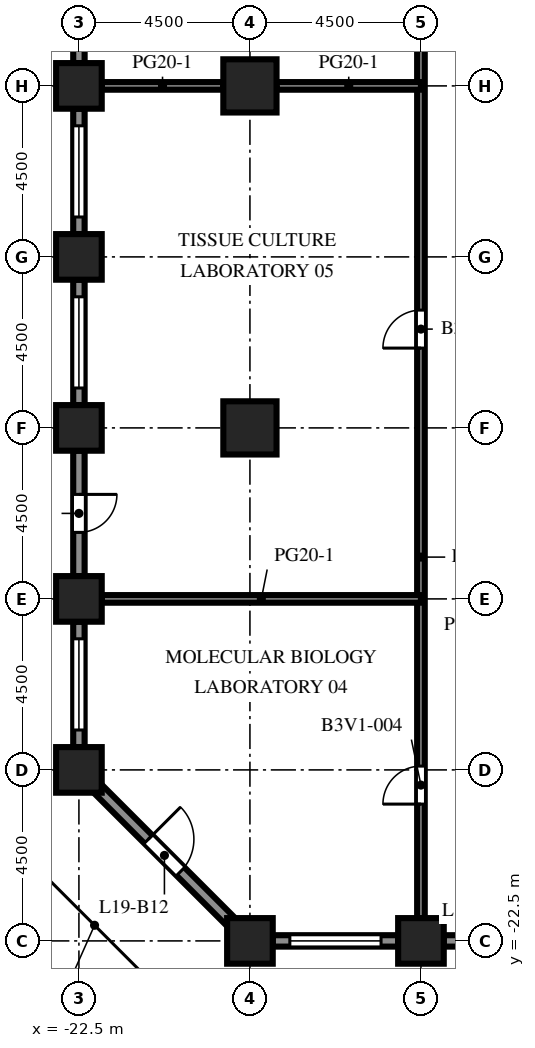
"""IFC4 building model, lengths in metres.
Left out: names, types, materials, properties, quantities, classifications, styles, units other than length and angle.
Written with IfcOpenShell. Run it as: python <this file> out.ifc"""

import sys

from ifc_helpers import new_model, si_unit, direction, frame, frame_2d, origin, origin_2d, place, context, subcontext, project, spatial, rectangle, extrude, element, fill, save


model = new_model("IFC4")
c1 = context("Model", 3, precision=1e-05, world=origin(), true_north=direction((0.0, 1.0)))
c2 = subcontext(c1, "Body", "Model", "MODEL_VIEW")
j1 = project(units=[si_unit("LENGTHUNIT", "METRE"), si_unit("PLANEANGLEUNIT", "RADIAN")], contexts=[c1])
p1 = place(None, origin())
s1 = spatial("IfcSite", under=j1, at=p1, CompositionType="ELEMENT")
p2 = place(p1, origin())
s2 = spatial("IfcBuilding", under=s1, at=p2, CompositionType="ELEMENT")
p3 = place(p2, frame((0.0, 0.0, 86.1)))
s3 = spatial("IfcBuildingStorey", under=s2, at=p3, CompositionType="ELEMENT", Elevation=86.1)
for number, where, z_axis, x_axis in (
    (1, (-22.5, -18.0, 0.0), (0.0, 0.0, 1.0), (1.0, 0.0, 0.0)),
    (2, (-22.5, -13.5, 0.0), (0.0, 0.0, 1.0), (1.0, 0.0, 0.0)),
    (3, (-22.5, -9.0, 0.0), (0.0, 0.0, 1.0), (1.0, 0.0, 0.0)),
    (4, (-22.5, -4.5, 0.0), (0.0, 0.0, 1.0), (1.0, 0.0, 0.0)),
    (5, (-22.5, 0.0, 0.0), (0.0, 0.0, 1.0), (1.0, 0.0, 0.0)),
    (6, (-18.0, -22.5, 0.0), (0.0, 0.0, 1.0), (1.0, 0.0, 0.0)),
    (7, (-13.5, -22.5, 0.0), (0.0, 0.0, 1.0), (1.0, 0.0, 0.0)),
):
    element("IfcColumn", number, at=place(p3, frame(where, z_axis=z_axis, x_axis=x_axis)), inside=s3, PredefinedType="COLUMN", context=c2, shape_type="SweptSolid", body=[
        extrude(rectangle(XDim=1.2, YDim=1.2, at=origin_2d()), origin(), (0.0, 0.0, 1.0), 4.1),
    ])
for number, where, z_axis, x_axis in (
    (8, (-18.0, -9.0, 0.0), (0.0, 0.0, 1.0), (1.0, 0.0, 0.0)),
    (9, (-18.0, 0.0, 0.0), (0.0, 0.0, 1.0), (1.0, 0.0, 0.0)),
):
    element("IfcColumn", number, at=place(p3, frame(where, z_axis=z_axis, x_axis=x_axis)), inside=s3, PredefinedType="COLUMN", context=c2, shape_type="SweptSolid", body=[
        extrude(rectangle(XDim=1.4, YDim=1.4, at=origin_2d()), origin(), (0.0, 0.0, 1.0), 4.1),
    ])
p4 = place(p3, frame((-14.1, -22.5, 0.0), z_axis=(0.0, 0.0, 1.0), x_axis=(-1.0, 0.0, 0.0)))
e10 = element("IfcWall", 10, at=p4, inside=s3, PredefinedType="SOLIDWALL", context=c2, shape_type="SweptSolid", body=[
    extrude(rectangle(XDim=3.3, YDim=0.3, at=frame_2d((1.65, 0.0))), origin(), (0.0, 0.0, 1.0), 2.75),
])
p5 = place(p4, frame((0.45, 0.0, 0.8)))
e11 = element("IfcOpeningElement", 11, at=p5, cuts=e10, PredefinedType="OPENING", context=c2, shape_type="SweptSolid", body=[
    extrude(rectangle(XDim=2.4, YDim=1.7, at=frame_2d((1.2, 0.85))), frame((0.0, 0.16, 0.0), z_axis=(0.0, -1.0, 0.0), x_axis=(1.0, 0.0, 0.0)), (0.0, 0.0, 1.0), 0.32),
])
p6 = place(p3, frame((-9.6, -22.5, 0.0), z_axis=(0.0, 0.0, 1.0), x_axis=(-1.0, 0.0, 0.0)))
e12 = element("IfcWall", 12, at=p6, inside=s3, PredefinedType="SOLIDWALL", context=c2, shape_type="SweptSolid", body=[
    extrude(rectangle(XDim=3.3, YDim=0.3, at=frame_2d((1.65, 0.0))), origin(), (0.0, 0.0, 1.0), 2.75),
])
p7 = place(p6, frame((1.15, 0.0, 0.0)))
e13 = element("IfcOpeningElement", 13, at=p7, cuts=e12, PredefinedType="OPENING", context=c2, shape_type="SweptSolid", body=[
    extrude(rectangle(XDim=1.0, YDim=2.2, at=frame_2d((0.5, 1.1))), frame((0.0, 0.16, 0.0), z_axis=(0.0, -1.0, 0.0), x_axis=(1.0, 0.0, 0.0)), (0.0, 0.0, 1.0), 0.32),
])
p8 = place(p3, frame((-22.5, 0.6, 0.0), z_axis=(0.0, 0.0, 1.0), x_axis=(0.0, 1.0, 0.0)))
e14 = element("IfcWall", 14, at=p8, inside=s3, PredefinedType="SOLIDWALL", context=c2, shape_type="SweptSolid", body=[
    extrude(rectangle(XDim=3.3, YDim=0.3, at=frame_2d((1.65, 0.0))), origin(), (0.0, 0.0, 1.0), 2.75),
])
p9 = place(p8, frame((0.45, 0.0, 0.8)))
e15 = element("IfcOpeningElement", 15, at=p9, cuts=e14, PredefinedType="OPENING", context=c2, shape_type="SweptSolid", body=[
    extrude(rectangle(XDim=2.4, YDim=1.7, at=frame_2d((1.2, 0.85))), frame((0.0, 0.16, 0.0), z_axis=(0.0, -1.0, 0.0), x_axis=(1.0, 0.0, 0.0)), (0.0, 0.0, 1.0), 0.32),
])
p10 = place(p3, frame((-22.5, -3.9, 0.0), z_axis=(0.0, 0.0, 1.0), x_axis=(0.0, 1.0, 0.0)))
e16 = element("IfcWall", 16, at=p10, inside=s3, PredefinedType="SOLIDWALL", context=c2, shape_type="SweptSolid", body=[
    extrude(rectangle(XDim=3.3, YDim=0.3, at=frame_2d((1.65, 0.0))), origin(), (0.0, 0.0, 1.0), 2.75),
])
p11 = place(p10, frame((0.45, 0.0, 0.8)))
e17 = element("IfcOpeningElement", 17, at=p11, cuts=e16, PredefinedType="OPENING", context=c2, shape_type="SweptSolid", body=[
    extrude(rectangle(XDim=2.4, YDim=1.7, at=frame_2d((1.2, 0.85))), frame((0.0, 0.16, 0.0), z_axis=(0.0, -1.0, 0.0), x_axis=(1.0, 0.0, 0.0)), (0.0, 0.0, 1.0), 0.32),
])
p12 = place(p3, frame((-22.5, -8.4, 0.0), z_axis=(0.0, 0.0, 1.0), x_axis=(0.0, 1.0, 0.0)))
e18 = element("IfcWall", 18, at=p12, inside=s3, PredefinedType="SOLIDWALL", context=c2, shape_type="SweptSolid", body=[
    extrude(rectangle(XDim=3.3, YDim=0.3, at=frame_2d((1.65, 0.0))), origin(), (0.0, 0.0, 1.0), 2.75),
])
p13 = place(p12, frame((0.45, 0.0, 0.8)))
e19 = element("IfcOpeningElement", 19, at=p13, cuts=e18, PredefinedType="OPENING", context=c2, shape_type="SweptSolid", body=[
    extrude(rectangle(XDim=2.4, YDim=1.7, at=frame_2d((1.2, 0.85))), frame((0.0, 0.16, 0.0), z_axis=(0.0, -1.0, 0.0), x_axis=(1.0, 0.0, 0.0)), (0.0, 0.0, 1.0), 0.32),
])
p14 = place(p3, frame((-22.5, -12.9, 0.0), z_axis=(0.0, 0.0, 1.0), x_axis=(0.0, 1.0, 0.0)))
e20 = element("IfcWall", 20, at=p14, inside=s3, PredefinedType="SOLIDWALL", context=c2, shape_type="SweptSolid", body=[
    extrude(rectangle(XDim=3.3, YDim=0.3, at=frame_2d((1.65, 0.0))), origin(), (0.0, 0.0, 1.0), 2.75),
])
p15 = place(p14, frame((1.15, 0.0, 0.0)))
e21 = element("IfcOpeningElement", 21, at=p15, cuts=e20, PredefinedType="OPENING", context=c2, shape_type="SweptSolid", body=[
    extrude(rectangle(XDim=1.0, YDim=2.2, at=frame_2d((0.5, 1.1))), frame((0.0, 0.16, 0.0), z_axis=(0.0, -1.0, 0.0), x_axis=(1.0, 0.0, 0.0)), (0.0, 0.0, 1.0), 0.32),
])
p16 = place(p3, frame((-22.5, -17.4, 0.0), z_axis=(0.0, 0.0, 1.0), x_axis=(0.0, 1.0, 0.0)))
e22 = element("IfcWall", 22, at=p16, inside=s3, PredefinedType="SOLIDWALL", context=c2, shape_type="SweptSolid", body=[
    extrude(rectangle(XDim=3.3, YDim=0.3, at=frame_2d((1.65, 0.0))), origin(), (0.0, 0.0, 1.0), 2.75),
])
p17 = place(p16, frame((0.45, 0.0, 0.8)))
e23 = element("IfcOpeningElement", 23, at=p17, cuts=e22, PredefinedType="OPENING", context=c2, shape_type="SweptSolid", body=[
    extrude(rectangle(XDim=2.4, YDim=1.7, at=frame_2d((1.2, 0.85))), frame((0.0, 0.16, 0.0), z_axis=(0.0, -1.0, 0.0), x_axis=(1.0, 0.0, 0.0)), (0.0, 0.0, 1.0), 0.32),
])
p18 = place(p3, frame((-18.494, -22.006, 0.0), z_axis=(0.0, 0.0, 1.0), x_axis=(-0.707106781187, 0.707106781187, 0.0)))
e24 = element("IfcWall", 24, at=p18, inside=s3, PredefinedType="SOLIDWALL", context=c2, shape_type="SweptSolid", body=[
    extrude(rectangle(XDim=4.967, YDim=0.3, at=frame_2d((2.483, 0.0))), origin(), (0.0, 0.0, 1.0), 2.75),
])
p19 = place(p18, frame((1.884, 0.0, 0.0)))
e25 = element("IfcOpeningElement", 25, at=p19, cuts=e24, PredefinedType="OPENING", context=c2, shape_type="SweptSolid", body=[
    extrude(rectangle(XDim=1.2, YDim=2.2, at=frame_2d((0.6, 1.1))), frame((0.0, 0.16, 0.0), z_axis=(0.0, -1.0, 0.0), x_axis=(1.0, 0.0, 0.0)), (0.0, 0.0, 1.0), 0.32),
])
p20 = place(p3, frame((-13.5, -21.9, 0.0), z_axis=(0.0, 0.0, 1.0), x_axis=(0.0, 1.0, 0.0)))
e26 = element("IfcWall", 26, at=p20, inside=s3, PredefinedType="PARTITIONING", context=c2, shape_type="SweptSolid", body=[
    extrude(rectangle(XDim=52.8, YDim=0.2, at=frame_2d((26.4, 0.0))), origin(), (0.0, 0.0, 1.0), 3.65),
])
p21 = place(p20, frame((3.0, 0.0, 0.0)))
e27 = element("IfcOpeningElement", 27, at=p21, cuts=e26, PredefinedType="OPENING", context=c2, shape_type="SweptSolid", body=[
    extrude(rectangle(XDim=1.0, YDim=2.1, at=frame_2d((0.5, 1.05))), frame((0.0, 0.11, 0.0), z_axis=(0.0, -1.0, 0.0), x_axis=(1.0, 0.0, 0.0)), (0.0, 0.0, 1.0), 0.22),
])
p22 = place(p20, frame((15.0, 0.0, 0.0)))
e28 = element("IfcOpeningElement", 28, at=p22, cuts=e26, PredefinedType="OPENING", context=c2, shape_type="SweptSolid", body=[
    extrude(rectangle(XDim=1.0, YDim=2.1, at=frame_2d((0.5, 1.05))), frame((0.0, 0.11, 0.0), z_axis=(0.0, -1.0, 0.0), x_axis=(1.0, 0.0, 0.0)), (0.0, 0.0, 1.0), 0.22),
])
p23 = place(p20, frame((25.75, 0.0, 0.0)))
e29 = element("IfcOpeningElement", 29, at=p23, cuts=e26, PredefinedType="OPENING", context=c2, shape_type="SweptSolid", body=[
    extrude(rectangle(XDim=1.0, YDim=2.1, at=frame_2d((0.5, 1.05))), frame((0.0, 0.11, 0.0), z_axis=(0.0, -1.0, 0.0), x_axis=(1.0, 0.0, 0.0)), (0.0, 0.0, 1.0), 0.22),
])
p24 = place(p20, frame((34.5, 0.0, 0.0)))
e30 = element("IfcOpeningElement", 30, at=p24, cuts=e26, PredefinedType="OPENING", context=c2, shape_type="SweptSolid", body=[
    extrude(rectangle(XDim=1.0, YDim=2.1, at=frame_2d((0.5, 1.05))), frame((0.0, 0.11, 0.0), z_axis=(0.0, -1.0, 0.0), x_axis=(1.0, 0.0, 0.0)), (0.0, 0.0, 1.0), 0.22),
])
p25 = place(p20, frame((41.5, 0.0, 0.0)))
e31 = element("IfcOpeningElement", 31, at=p25, cuts=e26, PredefinedType="OPENING", context=c2, shape_type="SweptSolid", body=[
    extrude(rectangle(XDim=1.0, YDim=2.1, at=frame_2d((0.5, 1.05))), frame((0.0, 0.11, 0.0), z_axis=(0.0, -1.0, 0.0), x_axis=(1.0, 0.0, 0.0)), (0.0, 0.0, 1.0), 0.22),
])
p26 = place(p20, frame((48.25, 0.0, 0.0)))
e32 = element("IfcOpeningElement", 32, at=p26, cuts=e26, PredefinedType="OPENING", context=c2, shape_type="SweptSolid", body=[
    extrude(rectangle(XDim=1.0, YDim=2.1, at=frame_2d((0.5, 1.05))), frame((0.0, 0.11, 0.0), z_axis=(0.0, -1.0, 0.0), x_axis=(1.0, 0.0, 0.0)), (0.0, 0.0, 1.0), 0.22),
])
p27 = place(p3, frame((-21.9, -13.5, 0.0), z_axis=(0.0, 0.0, 1.0), x_axis=(1.0, 0.0, 0.0)))
e33 = element("IfcWall", 33, at=p27, inside=s3, PredefinedType="PARTITIONING", context=c2, shape_type="SweptSolid", body=[
    extrude(rectangle(XDim=8.4, YDim=0.2, at=frame_2d((4.2, 0.0))), origin(), (0.0, 0.0, 1.0), 3.65),
])
p28 = place(p3, frame((-21.9, 0.0, 0.0), z_axis=(0.0, 0.0, 1.0), x_axis=(1.0, 0.0, 0.0)))
e34 = element("IfcWall", 34, at=p28, inside=s3, PredefinedType="PARTITIONING", context=c2, shape_type="SweptSolid", body=[
    extrude(rectangle(XDim=3.2, YDim=0.2, at=frame_2d((1.6, 0.0))), origin(), (0.0, 0.0, 1.0), 3.65),
])
p29 = place(p3, frame((-17.3, 0.0, 0.0), z_axis=(0.0, 0.0, 1.0), x_axis=(1.0, 0.0, 0.0)))
e35 = element("IfcWall", 35, at=p29, inside=s3, PredefinedType="PARTITIONING", context=c2, shape_type="SweptSolid", body=[
    extrude(rectangle(XDim=3.8, YDim=0.2, at=frame_2d((1.9, 0.0))), origin(), (0.0, 0.0, 1.0), 3.65),
])
p30 = place(p5, origin())
e36 = element("IfcWindow", 36, at=p30, inside=s3, PartitioningType="SINGLE_PANEL", PredefinedType="WINDOW", context=c2, shape_type="SweptSolid", body=[
    extrude(rectangle(XDim=2.4, YDim=1.7, at=frame_2d((1.2, 0.85))), frame((0.0, 0.03, 0.0), z_axis=(0.0, -1.0, 0.0), x_axis=(1.0, 0.0, 0.0)), (0.0, 0.0, 1.0), 0.06),
])
fill(e11, e36)
p31 = place(p11, origin())
e37 = element("IfcWindow", 37, at=p31, inside=s3, PartitioningType="SINGLE_PANEL", PredefinedType="WINDOW", context=c2, shape_type="SweptSolid", body=[
    extrude(rectangle(XDim=2.4, YDim=1.7, at=frame_2d((1.2, 0.85))), frame((0.0, 0.03, 0.0), z_axis=(0.0, -1.0, 0.0), x_axis=(1.0, 0.0, 0.0)), (0.0, 0.0, 1.0), 0.06),
])
fill(e17, e37)
p32 = place(p13, origin())
e38 = element("IfcWindow", 38, at=p32, inside=s3, PartitioningType="SINGLE_PANEL", PredefinedType="WINDOW", context=c2, shape_type="SweptSolid", body=[
    extrude(rectangle(XDim=2.4, YDim=1.7, at=frame_2d((1.2, 0.85))), frame((0.0, 0.03, 0.0), z_axis=(0.0, -1.0, 0.0), x_axis=(1.0, 0.0, 0.0)), (0.0, 0.0, 1.0), 0.06),
])
fill(e19, e38)
p33 = place(p15, origin())
e39 = element("IfcDoor", 39, at=p33, inside=s3, OperationType="SINGLE_SWING_RIGHT", PredefinedType="DOOR", context=c2, shape_type="SweptSolid", body=[
    extrude(rectangle(XDim=1.0, YDim=2.2, at=frame_2d((0.5, 1.1))), frame((0.0, 0.025, 0.0), z_axis=(0.0, -1.0, 0.0), x_axis=(1.0, 0.0, 0.0)), (0.0, 0.0, 1.0), 0.05),
])
fill(e21, e39)
p34 = place(p17, origin())
e40 = element("IfcWindow", 40, at=p34, inside=s3, PartitioningType="SINGLE_PANEL", PredefinedType="WINDOW", context=c2, shape_type="SweptSolid", body=[
    extrude(rectangle(XDim=2.4, YDim=1.7, at=frame_2d((1.2, 0.85))), frame((0.0, 0.03, 0.0), z_axis=(0.0, -1.0, 0.0), x_axis=(1.0, 0.0, 0.0)), (0.0, 0.0, 1.0), 0.06),
])
fill(e23, e40)
p35 = place(p19, origin())
e41 = element("IfcDoor", 41, at=p35, inside=s3, OperationType="SINGLE_SWING_RIGHT", PredefinedType="DOOR", context=c2, shape_type="SweptSolid", body=[
    extrude(rectangle(XDim=1.2, YDim=2.2, at=frame_2d((0.6, 1.1))), frame((0.0, 0.025, 0.0), z_axis=(0.0, -1.0, 0.0), x_axis=(1.0, 0.0, 0.0)), (0.0, 0.0, 1.0), 0.05),
])
fill(e25, e41)
p36 = place(p21, origin())
e42 = element("IfcDoor", 42, at=p36, inside=s3, OperationType="SINGLE_SWING_LEFT", PredefinedType="DOOR", context=c2, shape_type="SweptSolid", body=[
    extrude(rectangle(XDim=1.0, YDim=2.1, at=frame_2d((0.5, 1.05))), frame((0.0, 0.025, 0.0), z_axis=(0.0, -1.0, 0.0), x_axis=(1.0, 0.0, 0.0)), (0.0, 0.0, 1.0), 0.05),
])
fill(e27, e42)
p37 = place(p22, origin())
e43 = element("IfcDoor", 43, at=p37, inside=s3, OperationType="SINGLE_SWING_LEFT", PredefinedType="DOOR", context=c2, shape_type="SweptSolid", body=[
    extrude(rectangle(XDim=1.0, YDim=2.1, at=frame_2d((0.5, 1.05))), frame((0.0, 0.025, 0.0), z_axis=(0.0, -1.0, 0.0), x_axis=(1.0, 0.0, 0.0)), (0.0, 0.0, 1.0), 0.05),
])
fill(e28, e43)
save(model, sys.argv[1])
